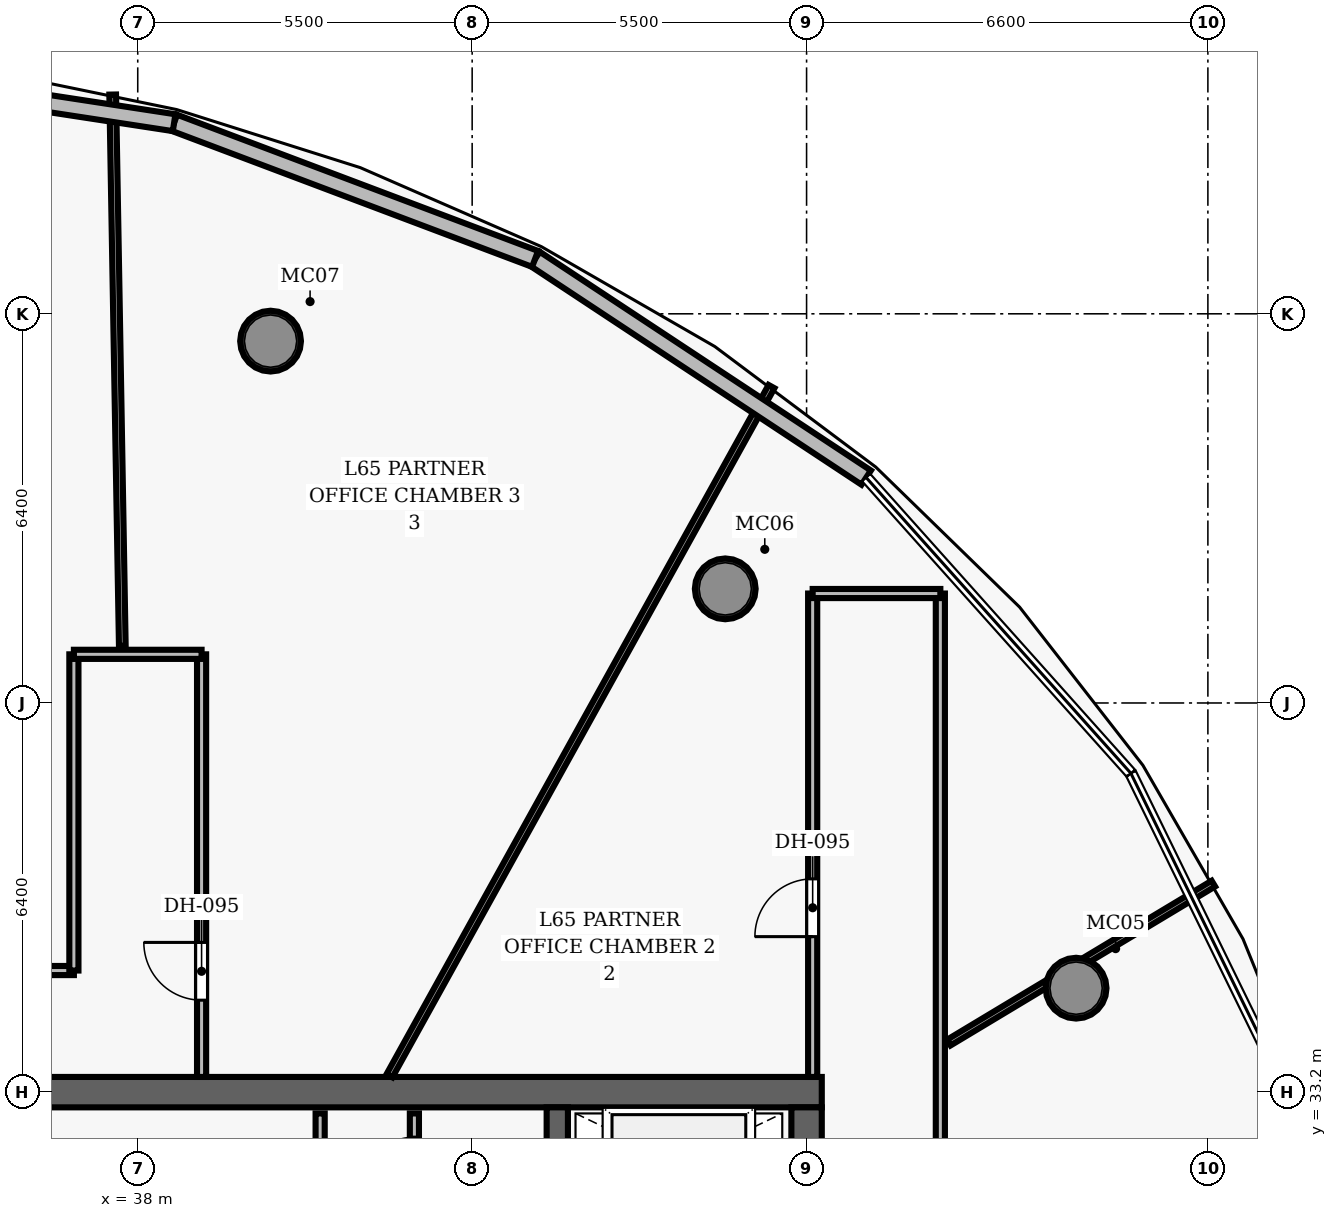
"""IFC4 building model, lengths in metres.
Left out: names, types, materials, properties, quantities, classifications, styles, units other than length and angle.
Written with IfcOpenShell. Run it as: python <this file> out.ifc"""

import sys

from ifc_helpers import new_model, si_unit, direction, frame, frame_2d, origin, origin_2d, place, context, subcontext, project, spatial, rectangle, hollow_circle, extrude, element, fill, save


model = new_model("IFC4")
c1 = context("Model", 3, precision=1e-05, world=origin(), true_north=direction((0.0, 1.0)))
c2 = subcontext(c1, "Body", "Model", "MODEL_VIEW")
j1 = project(units=[si_unit("LENGTHUNIT", "METRE"), si_unit("PLANEANGLEUNIT", "RADIAN")], contexts=[c1])
p1 = place(None, origin())
s1 = spatial("IfcSite", under=j1, at=p1, CompositionType="ELEMENT")
p2 = place(p1, origin())
s2 = spatial("IfcBuilding", under=s1, at=p2, CompositionType="ELEMENT")
p3 = place(p2, frame((0.0, 0.0, 257.45)))
s3 = spatial("IfcBuildingStorey", under=s2, at=p3, CompositionType="ELEMENT", Elevation=257.45)
p4 = place(p3, frame((26.75, 33.2, 0.0), z_axis=(0.0, 0.0, 1.0), x_axis=(1.0, 0.0, 0.0)))
e1 = element("IfcWall", 1, at=p4, inside=s3, PredefinedType="SHEAR", context=c2, shape_type="SweptSolid", body=[
    extrude(rectangle(XDim=22.5, YDim=0.5, at=frame_2d((11.25, 0.0))), origin(), (0.0, 0.0, 1.0), 3.85),
])
p5 = place(p3, frame((49.0, 19.05, 0.0), z_axis=(0.0, 0.0, 1.0), x_axis=(0.0, 1.0, 0.0)))
e2 = element("IfcWall", 2, at=p5, inside=s3, PredefinedType="SHEAR", context=c2, shape_type="SweptSolid", body=[
    extrude(rectangle(XDim=13.9, YDim=0.5, at=frame_2d((6.95, 0.0))), origin(), (0.0, 0.0, 1.0), 3.85),
])
p6 = place(p5, frame((8.2, 0.0, 0.0)))
e3 = element("IfcOpeningElement", 3, at=p6, cuts=e2, PredefinedType="OPENING", context=c2, shape_type="SweptSolid", body=[
    extrude(rectangle(XDim=1.05, YDim=2.15, at=frame_2d((0.525, 1.075))), frame((0.0, 0.26, 0.0), z_axis=(0.0, -1.0, 0.0), x_axis=(1.0, 0.0, 0.0)), (0.0, 0.0, 1.0), 0.52),
])
p7 = place(p3, frame((44.9, 19.05, 0.0), z_axis=(0.0, 0.0, 1.0), x_axis=(0.0, 1.0, 0.0)))
e4 = element("IfcWall", 4, at=p7, inside=s3, PredefinedType="SHEAR", context=c2, shape_type="SweptSolid", body=[
    extrude(rectangle(XDim=13.9, YDim=0.35, at=frame_2d((6.95, 0.0))), origin(), (0.0, 0.0, 1.0), 3.85),
])
for number, where, z_axis, x_axis in (
    (5, (53.433, 34.91, 0.0), (0.0, 0.0, 1.0), (1.0, 0.0, 0.0)),
    (6, (47.662, 41.477, 0.0), (0.0, 0.0, 1.0), (1.0, 0.0, 0.0)),
    (7, (40.185, 45.551, 0.0), (0.0, 0.0, 1.0), (1.0, 0.0, 0.0)),
):
    element("IfcColumn", number, at=place(p3, frame(where, z_axis=z_axis, x_axis=x_axis)), inside=s3, PredefinedType="COLUMN", context=c2, shape_type="SweptSolid", body=[
        extrude(hollow_circle(Radius=0.5, WallThickness=0.045, at=origin_2d()), origin(), (0.0, 0.0, 1.0), 3.85),
    ])
p8 = place(p3, frame((41.0, 28.95, 0.0), z_axis=(0.0, 0.0, 1.0), x_axis=(0.0, 1.0, 0.0)))
e8 = element("IfcWall", 8, at=p8, inside=s3, PredefinedType="PARTITIONING", context=c2, shape_type="SweptSolid", body=[
    extrude(rectangle(XDim=3.9, YDim=0.15, at=frame_2d((1.95, 0.0))), origin(), (0.0, 0.0, 1.0), 3.04),
])
p9 = place(p8, frame((0.7, 0.0, 0.0)))
e9 = element("IfcOpeningElement", 9, at=p9, cuts=e8, PredefinedType="OPENING", context=c2, shape_type="SweptSolid", body=[
    extrude(rectangle(XDim=0.85, YDim=2.1, at=frame_2d((0.425, 1.05))), frame((0.0, 0.085, 0.0), z_axis=(0.0, -1.0, 0.0), x_axis=(1.0, 0.0, 0.0)), (0.0, 0.0, 1.0), 0.17),
])
p10 = place(p3, frame((42.55, 28.1, 0.0), z_axis=(0.0, 0.0, 1.0), x_axis=(0.0, 1.0, 0.0)))
e10 = element("IfcWall", 10, at=p10, inside=s3, PredefinedType="PARTITIONING", context=c2, shape_type="SweptSolid", body=[
    extrude(rectangle(XDim=4.75, YDim=0.15, at=frame_2d((2.375, 0.0))), origin(), (0.0, 0.0, 1.0), 3.04),
])
p11 = place(p10, frame((0.35, 0.0, 0.0)))
e11 = element("IfcOpeningElement", 11, at=p11, cuts=e10, PredefinedType="OPENING", context=c2, shape_type="SweptSolid", body=[
    extrude(rectangle(XDim=0.85, YDim=2.1, at=frame_2d((0.425, 1.05))), frame((0.0, 0.085, 0.0), z_axis=(0.0, -1.0, 0.0), x_axis=(1.0, 0.0, 0.0)), (0.0, 0.0, 1.0), 0.17),
])
p12 = place(p10, frame((1.93, 0.0, 0.0)))
e12 = element("IfcOpeningElement", 12, at=p12, cuts=e10, PredefinedType="OPENING", context=c2, shape_type="SweptSolid", body=[
    extrude(rectangle(XDim=0.85, YDim=2.1, at=frame_2d((0.425, 1.05))), frame((0.0, 0.085, 0.0), z_axis=(0.0, -1.0, 0.0), x_axis=(1.0, 0.0, 0.0)), (0.0, 0.0, 1.0), 0.17),
])
p13 = place(p10, frame((3.51, 0.0, 0.0)))
e13 = element("IfcOpeningElement", 13, at=p13, cuts=e10, PredefinedType="OPENING", context=c2, shape_type="SweptSolid", body=[
    extrude(rectangle(XDim=0.85, YDim=2.1, at=frame_2d((0.425, 1.05))), frame((0.0, 0.085, 0.0), z_axis=(0.0, -1.0, 0.0), x_axis=(1.0, 0.0, 0.0)), (0.0, 0.0, 1.0), 0.17),
])
p14 = place(p3, frame((26.9, 35.2, 0.0), z_axis=(0.0, 0.0, 1.0), x_axis=(1.0, 0.0, 0.0)))
e14 = element("IfcWall", 14, at=p14, inside=s3, PredefinedType="PARTITIONING", context=c2, shape_type="SweptSolid", body=[
    extrude(rectangle(XDim=10.05, YDim=0.15, at=frame_2d((5.025, 0.0))), origin(), (0.0, 0.0, 1.0), 3.04),
])
p15 = place(p14, frame((7.149, 0.0, 0.0)))
e15 = element("IfcOpeningElement", 15, at=p15, cuts=e14, PredefinedType="OPENING", context=c2, shape_type="SweptSolid", body=[
    extrude(rectangle(XDim=0.95, YDim=2.15, at=frame_2d((0.475, 1.075))), frame((0.0, 0.085, 0.0), z_axis=(0.0, -1.0, 0.0), x_axis=(1.0, 0.0, 0.0)), (0.0, 0.0, 1.0), 0.17),
])
p16 = place(p14, frame((3.872, 0.0, 0.0)))
e16 = element("IfcOpeningElement", 16, at=p16, cuts=e14, PredefinedType="OPENING", context=c2, shape_type="SweptSolid", body=[
    extrude(rectangle(XDim=0.95, YDim=2.15, at=frame_2d((0.475, 1.075))), frame((0.0, 0.085, 0.0), z_axis=(0.0, -1.0, 0.0), x_axis=(1.0, 0.0, 0.0)), (0.0, 0.0, 1.0), 0.17),
])
p17 = place(p3, frame((51.2, 10.6, 0.0), z_axis=(0.0, 0.0, 1.0), x_axis=(0.0, 1.0, 0.0)))
e17 = element("IfcWall", 17, at=p17, inside=s3, PredefinedType="PARTITIONING", context=c2, shape_type="SweptSolid", body=[
    extrude(rectangle(XDim=30.8, YDim=0.15, at=frame_2d((15.4, 0.0))), origin(), (0.0, 0.0, 1.0), 3.04),
])
p18 = place(p17, frame((17.79, 0.0, 0.0)))
e18 = element("IfcOpeningElement", 18, at=p18, cuts=e17, PredefinedType="OPENING", context=c2, shape_type="SweptSolid", body=[
    extrude(rectangle(XDim=0.95, YDim=2.15, at=frame_2d((0.475, 1.075))), frame((0.0, 0.085, 0.0), z_axis=(0.0, -1.0, 0.0), x_axis=(1.0, 0.0, 0.0)), (0.0, 0.0, 1.0), 0.17),
])
p19 = place(p17, frame((11.348, 0.0, 0.0)))
e19 = element("IfcOpeningElement", 19, at=p19, cuts=e17, PredefinedType="OPENING", context=c2, shape_type="SweptSolid", body=[
    extrude(rectangle(XDim=0.95, YDim=2.15, at=frame_2d((0.475, 1.075))), frame((0.0, 0.085, 0.0), z_axis=(0.0, -1.0, 0.0), x_axis=(1.0, 0.0, 0.0)), (0.0, 0.0, 1.0), 0.17),
])
p20 = place(p3, frame((49.1, 33.45, 0.0), z_axis=(0.0, 0.0, 1.0), x_axis=(0.0, 1.0, 0.0)))
e20 = element("IfcWall", 20, at=p20, inside=s3, PredefinedType="PARTITIONING", context=c2, shape_type="SweptSolid", body=[
    extrude(rectangle(XDim=7.95, YDim=0.15, at=frame_2d((3.975, 0.0))), origin(), (0.0, 0.0, 1.0), 3.04),
])
p21 = place(p20, frame((2.308, 0.0, 0.0)))
e21 = element("IfcOpeningElement", 21, at=p21, cuts=e20, PredefinedType="OPENING", context=c2, shape_type="SweptSolid", body=[
    extrude(rectangle(XDim=0.95, YDim=2.15, at=frame_2d((0.475, 1.075))), frame((0.0, 0.085, 0.0), z_axis=(0.0, -1.0, 0.0), x_axis=(1.0, 0.0, 0.0)), (0.0, 0.0, 1.0), 0.17),
])
p22 = place(p3, frame((49.1, 41.4, 0.0), z_axis=(0.0, 0.0, 1.0), x_axis=(1.0, 0.0, 0.0)))
e22 = element("IfcWall", 22, at=p22, inside=s3, PredefinedType="PARTITIONING", context=c2, shape_type="SweptSolid", body=[
    extrude(rectangle(XDim=2.1, YDim=0.15, at=frame_2d((1.05, 0.0))), origin(), (0.0, 0.0, 1.0), 3.04),
])
p23 = place(p3, frame((36.95, 35.2, 0.0), z_axis=(0.0, 0.0, 1.0), x_axis=(0.0, 1.0, 0.0)))
e23 = element("IfcWall", 23, at=p23, inside=s3, PredefinedType="PARTITIONING", context=c2, shape_type="SweptSolid", body=[
    extrude(rectangle(XDim=5.2, YDim=0.15, at=frame_2d((2.6, 0.0))), origin(), (0.0, 0.0, 1.0), 3.04),
])
p24 = place(p3, frame((39.05, 33.45, 0.0), z_axis=(0.0, 0.0, 1.0), x_axis=(0.0, 1.0, 0.0)))
e24 = element("IfcWall", 24, at=p24, inside=s3, PredefinedType="PARTITIONING", context=c2, shape_type="SweptSolid", body=[
    extrude(rectangle(XDim=6.95, YDim=0.15, at=frame_2d((3.475, 0.0))), origin(), (0.0, 0.0, 1.0), 3.04),
])
p25 = place(p24, frame((1.262, 0.0, 0.0)))
e25 = element("IfcOpeningElement", 25, at=p25, cuts=e24, PredefinedType="OPENING", context=c2, shape_type="SweptSolid", body=[
    extrude(rectangle(XDim=0.95, YDim=2.15, at=frame_2d((0.475, 1.075))), frame((0.0, 0.085, 0.0), z_axis=(0.0, -1.0, 0.0), x_axis=(1.0, 0.0, 0.0)), (0.0, 0.0, 1.0), 0.17),
])
p26 = place(p3, frame((36.95, 40.4, 0.0), z_axis=(0.0, 0.0, 1.0), x_axis=(1.0, 0.0, 0.0)))
e26 = element("IfcWall", 26, at=p26, inside=s3, PredefinedType="PARTITIONING", context=c2, shape_type="SweptSolid", body=[
    extrude(rectangle(XDim=2.1, YDim=0.15, at=frame_2d((1.05, 0.0))), origin(), (0.0, 0.0, 1.0), 3.04),
])
p27 = place(p3, frame((51.34, 34.015, 0.0), z_axis=(0.0, 0.0, 1.0), x_axis=(0.857148919357, 0.515068665369, 0.0)))
e27 = element("IfcWall", 27, at=p27, inside=s3, PredefinedType="PARTITIONING", context=c2, shape_type="SweptSolid", body=[
    extrude(rectangle(XDim=5.075, YDim=0.11, at=frame_2d((2.538, 0.0))), origin(), (0.0, 0.0, 1.0), 3.04),
])
p28 = place(p3, frame((42.141, 33.47, 0.0), z_axis=(0.0, 0.0, 1.0), x_axis=(0.484814100985, 0.87461722341, 0.0)))
e28 = element("IfcWall", 28, at=p28, inside=s3, PredefinedType="PARTITIONING", context=c2, shape_type="SweptSolid", body=[
    extrude(rectangle(XDim=12.958, YDim=0.11, at=frame_2d((6.479, 0.0))), origin(), (0.0, 0.0, 1.0), 3.04),
])
p29 = place(p3, frame((37.746, 40.54, 0.0), z_axis=(0.0, 0.0, 1.0), x_axis=(-0.01744812848, 0.999847769819, 0.0)))
e29 = element("IfcWall", 29, at=p29, inside=s3, PredefinedType="PARTITIONING", context=c2, shape_type="SweptSolid", body=[
    extrude(rectangle(XDim=9.067, YDim=0.11, at=frame_2d((4.534, 0.0))), origin(), (0.0, 0.0, 1.0), 3.04),
])
p30 = place(p3, frame((44.535, 46.903, 0.0), z_axis=(0.0, 0.0, 1.0), x_axis=(0.834436695952, -0.551103801882, 0.0)))
e30 = element("IfcWall", 30, at=p30, inside=s3, PredefinedType="SOLIDWALL", context=c2, shape_type="SweptSolid", body=[
    extrude(rectangle(XDim=6.526, YDim=0.28, at=frame_2d((3.263, 0.0))), origin(), (0.0, 0.0, 1.0), 3.625),
])
p31 = place(p3, frame((38.598, 49.143, 0.0), z_axis=(0.0, 0.0, 1.0), x_axis=(0.935625218408, -0.352994972597, 0.0)))
e31 = element("IfcWall", 31, at=p31, inside=s3, PredefinedType="SOLIDWALL", context=c2, shape_type="SweptSolid", body=[
    extrude(rectangle(XDim=6.345, YDim=0.28, at=frame_2d((3.172, 0.0))), origin(), (0.0, 0.0, 1.0), 3.625),
])
p32 = place(p3, frame((32.806, 50.029, 0.0), z_axis=(0.0, 0.0, 1.0), x_axis=(0.98850473066, -0.151189938364, 0.0)))
e32 = element("IfcWall", 32, at=p32, inside=s3, PredefinedType="SOLIDWALL", context=c2, shape_type="SweptSolid", body=[
    extrude(rectangle(XDim=5.86, YDim=0.28, at=frame_2d((2.93, 0.0))), origin(), (0.0, 0.0, 1.0), 3.625),
])
p33 = place(p13, origin())
e33 = element("IfcDoor", 33, at=p33, inside=s3, OperationType="SINGLE_SWING_LEFT", PredefinedType="DOOR", context=c2, shape_type="SweptSolid", body=[
    extrude(rectangle(XDim=0.85, YDim=2.1, at=frame_2d((0.425, 1.05))), frame((0.0, 0.025, 0.0), z_axis=(0.0, -1.0, 0.0), x_axis=(1.0, 0.0, 0.0)), (0.0, 0.0, 1.0), 0.05),
])
fill(e13, e33)
p34 = place(p21, origin())
e34 = element("IfcDoor", 34, at=p34, inside=s3, OperationType="SINGLE_SWING_LEFT", PredefinedType="DOOR", context=c2, shape_type="SweptSolid", body=[
    extrude(rectangle(XDim=0.95, YDim=2.15, at=frame_2d((0.475, 1.075))), frame((0.0, 0.025, 0.0), z_axis=(0.0, -1.0, 0.0), x_axis=(1.0, 0.0, 0.0)), (0.0, 0.0, 1.0), 0.05),
])
fill(e21, e34)
p35 = place(p25, origin())
e35 = element("IfcDoor", 35, at=p35, inside=s3, OperationType="SINGLE_SWING_RIGHT", PredefinedType="DOOR", context=c2, shape_type="SweptSolid", body=[
    extrude(rectangle(XDim=0.95, YDim=2.15, at=frame_2d((0.475, 1.075))), frame((0.0, 0.025, 0.0), z_axis=(0.0, -1.0, 0.0), x_axis=(1.0, 0.0, 0.0)), (0.0, 0.0, 1.0), 0.05),
])
fill(e25, e35)
save(model, sys.argv[1])
